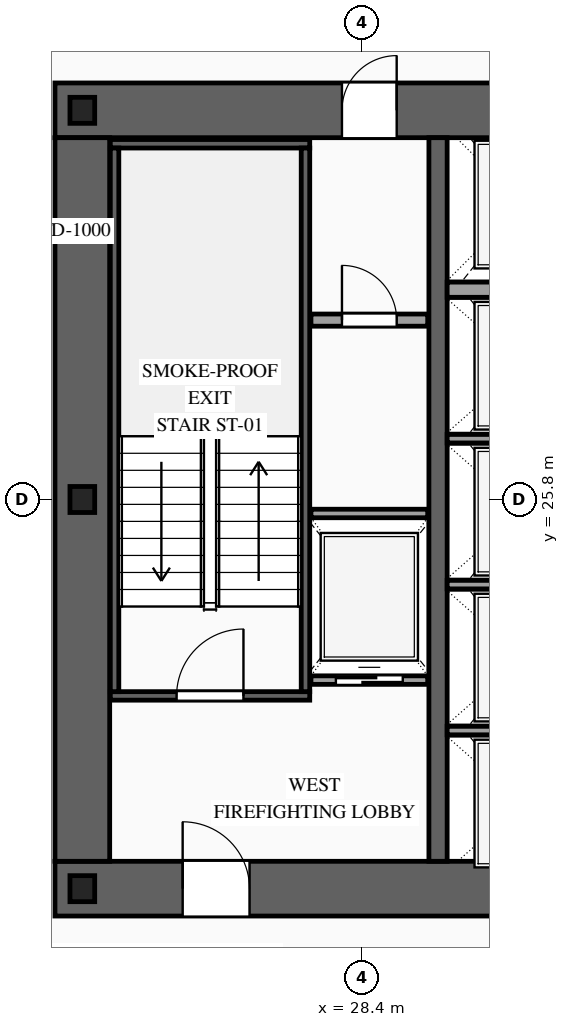
"""IFC4 building model, lengths in metres.
Left out: names, types, materials, properties, quantities, classifications, styles, units other than length and angle.
Written with IfcOpenShell. Run it as: python <this file> out.ifc"""

import sys

from ifc_helpers import new_model, si_unit, direction, frame, frame_2d, origin, origin_2d, place, context, subcontext, project, spatial, rectangle, i_section, extrude, source, transform, mapped, element, fill, save


model = new_model("IFC4")
c1 = context("Model", 3, precision=1e-05, world=origin(), true_north=direction((0.0, 1.0)))
c2 = subcontext(c1, "Body", "Model", "MODEL_VIEW")
j1 = project(units=[si_unit("LENGTHUNIT", "METRE"), si_unit("PLANEANGLEUNIT", "RADIAN")], contexts=[c1])
p1 = place(None, origin())
s1 = spatial("IfcSite", under=j1, at=p1, CompositionType="ELEMENT")
p2 = place(p1, origin())
s2 = spatial("IfcBuilding", under=s1, at=p2, CompositionType="ELEMENT")
p3 = place(p2, frame((0.0, 0.0, 60.4)))
s3 = spatial("IfcBuildingStorey", under=s2, at=p3, CompositionType="ELEMENT", Elevation=60.4)
p4 = place(p3, frame((23.35, 19.4, 0.0), z_axis=(0.0, 0.0, 1.0), x_axis=(1.0, 0.0, 0.0)))
e1 = element("IfcWall", 1, at=p4, inside=s3, PredefinedType="SHEAR", context=c2, shape_type="SweptSolid", body=[
    extrude(rectangle(XDim=27.3, YDim=0.9, at=frame_2d((13.65, 0.0))), origin(), (0.0, 0.0, 1.0), 3.6),
])
p5 = place(p4, frame((2.1, 0.0, 0.0)))
e2 = element("IfcOpeningElement", 2, at=p5, cuts=e1, PredefinedType="OPENING", context=c2, shape_type="SweptSolid", body=[
    extrude(rectangle(XDim=1.1, YDim=2.2, at=frame_2d((0.55, 1.1))), frame((0.0, 0.465, 0.0), z_axis=(0.0, -1.0, 0.0), x_axis=(1.0, 0.0, 0.0)), (0.0, 0.0, 1.0), 0.93),
])
p6 = place(p4, frame((10.0, 0.0, 0.0)))
e3 = element("IfcOpeningElement", 3, at=p6, cuts=e1, PredefinedType="OPENING", context=c2, shape_type="SweptSolid", body=[
    extrude(rectangle(XDim=1.1, YDim=2.2, at=frame_2d((0.55, 1.1))), frame((0.0, 0.465, 0.0), z_axis=(0.0, -1.0, 0.0), x_axis=(1.0, 0.0, 0.0)), (0.0, 0.0, 1.0), 0.93),
])
p7 = place(p4, frame((23.2, 0.0, 0.0)))
e4 = element("IfcOpeningElement", 4, at=p7, cuts=e1, PredefinedType="OPENING", context=c2, shape_type="SweptSolid", body=[
    extrude(rectangle(XDim=1.1, YDim=2.2, at=frame_2d((0.55, 1.1))), frame((0.0, 0.465, 0.0), z_axis=(0.0, -1.0, 0.0), x_axis=(1.0, 0.0, 0.0)), (0.0, 0.0, 1.0), 0.93),
])
p8 = place(p4, frame((19.82, 0.0, 0.0)))
e5 = element("IfcOpeningElement", 5, at=p8, cuts=e1, PredefinedType="OPENING", context=c2, shape_type="SweptSolid", body=[
    extrude(rectangle(XDim=0.9, YDim=2.15, at=frame_2d((0.45, 1.075))), frame((0.0, 0.465, 0.0), z_axis=(0.0, -1.0, 0.0), x_axis=(1.0, 0.0, 0.0)), (0.0, 0.0, 1.0), 0.93),
])
p9 = place(p4, frame((18.38, 0.0, 0.0)))
e6 = element("IfcOpeningElement", 6, at=p9, cuts=e1, PredefinedType="OPENING", context=c2, shape_type="SweptSolid", body=[
    extrude(rectangle(XDim=0.9, YDim=2.15, at=frame_2d((0.45, 1.075))), frame((0.0, 0.465, 0.0), z_axis=(0.0, -1.0, 0.0), x_axis=(1.0, 0.0, 0.0)), (0.0, 0.0, 1.0), 0.93),
])
p10 = place(p3, frame((23.35, 32.2, 0.0), z_axis=(0.0, 0.0, 1.0), x_axis=(1.0, 0.0, 0.0)))
e7 = element("IfcWall", 7, at=p10, inside=s3, PredefinedType="SHEAR", context=c2, shape_type="SweptSolid", body=[
    extrude(rectangle(XDim=27.3, YDim=0.9, at=frame_2d((13.65, 0.0))), origin(), (0.0, 0.0, 1.0), 3.6),
])
p11 = place(p10, frame((4.72, 0.0, 0.0)))
e8 = element("IfcOpeningElement", 8, at=p11, cuts=e7, PredefinedType="OPENING", context=c2, shape_type="SweptSolid", body=[
    extrude(rectangle(XDim=0.9, YDim=2.15, at=frame_2d((0.45, 1.075))), frame((0.0, 0.465, 0.0), z_axis=(0.0, -1.0, 0.0), x_axis=(1.0, 0.0, 0.0)), (0.0, 0.0, 1.0), 0.93),
])
p12 = place(p10, frame((10.0, 0.0, 0.0)))
e9 = element("IfcOpeningElement", 9, at=p12, cuts=e7, PredefinedType="OPENING", context=c2, shape_type="SweptSolid", body=[
    extrude(rectangle(XDim=1.1, YDim=2.2, at=frame_2d((0.55, 1.1))), frame((0.0, 0.465, 0.0), z_axis=(0.0, -1.0, 0.0), x_axis=(1.0, 0.0, 0.0)), (0.0, 0.0, 1.0), 0.93),
])
p13 = place(p10, frame((15.85, 0.0, 0.0)))
e10 = element("IfcOpeningElement", 10, at=p13, cuts=e7, PredefinedType="OPENING", context=c2, shape_type="SweptSolid", body=[
    extrude(rectangle(XDim=1.1, YDim=2.2, at=frame_2d((0.55, 1.1))), frame((0.0, 0.465, 0.0), z_axis=(0.0, -1.0, 0.0), x_axis=(1.0, 0.0, 0.0)), (0.0, 0.0, 1.0), 0.93),
])
p14 = place(p10, frame((19.82, 0.0, 0.0)))
e11 = element("IfcOpeningElement", 11, at=p14, cuts=e7, PredefinedType="OPENING", context=c2, shape_type="SweptSolid", body=[
    extrude(rectangle(XDim=0.9, YDim=2.15, at=frame_2d((0.45, 1.075))), frame((0.0, 0.465, 0.0), z_axis=(0.0, -1.0, 0.0), x_axis=(1.0, 0.0, 0.0)), (0.0, 0.0, 1.0), 0.93),
])
m1 = source(origin(), c2, "Body", "SweptSolid", [
    extrude(rectangle(XDim=11.9, YDim=0.9, at=frame_2d((5.95, 0.0))), origin(), (0.0, 0.0, 1.0), 3.6),
])
p15 = place(p3, frame((23.8, 19.85, 0.0), z_axis=(0.0, 0.0, 1.0), x_axis=(0.0, 1.0, 0.0)))
e12 = element("IfcWall", 12, at=p15, inside=s3, PredefinedType="SHEAR", context=c2, shape_type="MappedRepresentation", body=[
    mapped(m1, transform((0.0, 0.0, 0.0), scale=1.0)),
])
m2 = source(origin(), c2, "Body", "SweptSolid", [
    extrude(rectangle(XDim=11.9, YDim=0.3, at=frame_2d((5.95, 0.0))), origin(), (0.0, 0.0, 1.0), 3.6),
])
p16 = place(p3, frame((29.65, 19.85, 0.0), z_axis=(0.0, 0.0, 1.0), x_axis=(0.0, 1.0, 0.0)))
e13 = element("IfcWall", 13, at=p16, inside=s3, PredefinedType="SOLIDWALL", context=c2, shape_type="MappedRepresentation", body=[
    mapped(m2, transform((0.0, 0.0, 0.0), scale=1.0)),
])
m3 = source(origin(), c2, "Body", "SweptSolid", [
    extrude(i_section(OverallWidth=0.407, OverallDepth=0.428, WebThickness=0.02, FlangeThickness=0.035, at=origin_2d()), origin(), (0.0, 0.0, 1.0), 3.6),
])
for number, where, z_axis, x_axis in (
    (14, (23.8, 19.4, 0.0), (0.0, 0.0, 1.0), (1.0, 0.0, 0.0)),
    (15, (23.8, 25.8, 0.0), (0.0, 0.0, 1.0), (1.0, 0.0, 0.0)),
    (16, (23.8, 32.2, 0.0), (0.0, 0.0, 1.0), (1.0, 0.0, 0.0)),
):
    element("IfcColumn", number, at=place(p3, frame(where, z_axis=z_axis, x_axis=x_axis)), inside=s3, PredefinedType="COLUMN", context=c2, shape_type="MappedRepresentation", body=[
        mapped(m3, transform((0.0, 0.0, 0.0), scale=1.0)),
    ])
p17 = place(p3, frame((27.56, 22.83, 0.0), z_axis=(0.0, 0.0, 1.0), x_axis=(1.0, 0.0, 0.0)))
e17 = element("IfcWall", 17, at=p17, inside=s3, PredefinedType="SOLIDWALL", context=c2, shape_type="SweptSolid", body=[
    extrude(rectangle(XDim=1.92, YDim=0.14, at=frame_2d((0.96, 0.0))), origin(), (0.0, 0.0, 1.0), 3.38),
])
p18 = place(p17, frame((0.41, 0.0, 0.0)))
e18 = element("IfcOpeningElement", 18, at=p18, cuts=e17, PredefinedType="OPENING", context=c2, shape_type="SweptSolid", body=[
    extrude(rectangle(XDim=1.1, YDim=2.2, at=frame_2d((0.55, 1.1))), frame((0.0, 0.085, 0.0), z_axis=(0.0, -1.0, 0.0), x_axis=(1.0, 0.0, 0.0)), (0.0, 0.0, 1.0), 0.17),
])
m4 = source(origin(), c2, "Body", "SweptSolid", [
    extrude(rectangle(XDim=1.92, YDim=0.14, at=frame_2d((0.96, 0.0))), origin(), (0.0, 0.0, 1.0), 3.38),
])
p19 = place(p3, frame((27.56, 25.57, 0.0), z_axis=(0.0, 0.0, 1.0), x_axis=(1.0, 0.0, 0.0)))
e19 = element("IfcWall", 19, at=p19, inside=s3, PredefinedType="SOLIDWALL", context=c2, shape_type="MappedRepresentation", body=[
    mapped(m4, transform((0.0, 0.0, 0.0), scale=1.0)),
])
m5 = source(origin(), c2, "Body", "SweptSolid", [
    extrude(rectangle(XDim=2.5, YDim=0.14, at=frame_2d((1.25, 0.0))), origin(), (0.0, 0.0, 1.0), 3.38),
])
for number, where, z_axis, x_axis in (
    (20, (29.8, 22.0, 0.0), (0.0, 0.0, 1.0), (1.0, 0.0, 0.0)),
    (21, (29.8, 24.4, 0.0), (0.0, 0.0, 1.0), (1.0, 0.0, 0.0)),
    (22, (29.8, 26.8, 0.0), (0.0, 0.0, 1.0), (1.0, 0.0, 0.0)),
):
    element("IfcWall", number, at=place(p3, frame(where, z_axis=z_axis, x_axis=x_axis)), inside=s3, PredefinedType="SOLIDWALL", context=c2, shape_type="MappedRepresentation", body=[
        mapped(m5, transform((0.0, 0.0, 0.0), scale=1.0)),
    ])
m6 = source(origin(), c2, "Body", "SweptSolid", [
    extrude(rectangle(XDim=2.5, YDim=0.25, at=frame_2d((1.25, 0.0))), origin(), (0.0, 0.0, 1.0), 3.38),
])
p20 = place(p3, frame((29.8, 29.25, 0.0), z_axis=(0.0, 0.0, 1.0), x_axis=(1.0, 0.0, 0.0)))
e23 = element("IfcWall", 23, at=p20, inside=s3, PredefinedType="SOLIDWALL", context=c2, shape_type="MappedRepresentation", body=[
    mapped(m6, transform((0.0, 0.0, 0.0), scale=1.0)),
])
p21 = place(p3, frame((24.26, 22.57, 0.0), z_axis=(0.0, 0.0, 1.0), x_axis=(1.0, 0.0, 0.0)))
e24 = element("IfcWall", 24, at=p21, inside=s3, PredefinedType="SOLIDWALL", context=c2, shape_type="SweptSolid", body=[
    extrude(rectangle(XDim=3.28, YDim=0.14, at=frame_2d((1.64, 0.0))), origin(), (0.0, 0.0, 1.0), 3.38),
])
p22 = place(p21, frame((1.09, 0.0, 0.0)))
e25 = element("IfcOpeningElement", 25, at=p22, cuts=e24, PredefinedType="OPENING", context=c2, shape_type="SweptSolid", body=[
    extrude(rectangle(XDim=1.1, YDim=2.2, at=frame_2d((0.55, 1.1))), frame((0.0, 0.085, 0.0), z_axis=(0.0, -1.0, 0.0), x_axis=(1.0, 0.0, 0.0)), (0.0, 0.0, 1.0), 0.17),
])
m7 = source(origin(), c2, "Body", "SweptSolid", [
    extrude(rectangle(XDim=3.28, YDim=0.14, at=frame_2d((1.64, 0.0))), origin(), (0.0, 0.0, 1.0), 3.38),
])
p23 = place(p3, frame((24.26, 31.65, 0.0), z_axis=(0.0, 0.0, 1.0), x_axis=(1.0, 0.0, 0.0)))
e26 = element("IfcWall", 26, at=p23, inside=s3, PredefinedType="SOLIDWALL", context=c2, shape_type="MappedRepresentation", body=[
    mapped(m7, transform((0.0, 0.0, 0.0), scale=1.0)),
])
m8 = source(origin(), c2, "Body", "SweptSolid", [
    extrude(rectangle(XDim=8.94, YDim=0.14, at=frame_2d((4.47, 0.0))), origin(), (0.0, 0.0, 1.0), 3.38),
])
for number, where, z_axis, x_axis in (
    (27, (24.33, 22.64, 0.0), (0.0, 0.0, 1.0), (0.0, 1.0, 0.0)),
    (28, (27.47, 22.64, 0.0), (0.0, 0.0, 1.0), (0.0, 1.0, 0.0)),
):
    element("IfcWall", number, at=place(p3, frame(where, z_axis=z_axis, x_axis=x_axis)), inside=s3, PredefinedType="SOLIDWALL", context=c2, shape_type="MappedRepresentation", body=[
        mapped(m8, transform((0.0, 0.0, 0.0), scale=1.0)),
    ])
p24 = place(p3, frame((27.56, 28.75, 0.0), z_axis=(0.0, 0.0, 1.0), x_axis=(1.0, 0.0, 0.0)))
e29 = element("IfcWall", 29, at=p24, inside=s3, PredefinedType="PARTITIONING", context=c2, shape_type="SweptSolid", body=[
    extrude(rectangle(XDim=1.92, YDim=0.2, at=frame_2d((0.96, 0.0))), origin(), (0.0, 0.0, 1.0), 3.38),
])
p25 = place(p24, frame((0.51, 0.0, 0.0)))
e30 = element("IfcOpeningElement", 30, at=p25, cuts=e29, PredefinedType="OPENING", context=c2, shape_type="SweptSolid", body=[
    extrude(rectangle(XDim=0.9, YDim=2.15, at=frame_2d((0.45, 1.075))), frame((0.0, 0.115, 0.0), z_axis=(0.0, -1.0, 0.0), x_axis=(1.0, 0.0, 0.0)), (0.0, 0.0, 1.0), 0.23),
])
m9 = source(origin(), c2, "Body", "SweptSolid", [
    extrude(rectangle(XDim=1.1, YDim=2.2, at=frame_2d((0.55, 1.1))), frame((0.0, 0.025, 0.0), z_axis=(0.0, -1.0, 0.0), x_axis=(1.0, 0.0, 0.0)), (0.0, 0.0, 1.0), 0.05),
])
p26 = place(p18, origin())
e31 = element("IfcDoor", 31, at=p26, inside=s3, OperationType="SLIDING_TO_LEFT", PredefinedType="DOOR", context=c2, shape_type="MappedRepresentation", body=[
    mapped(m9, transform((0.0, 0.0, 0.0), scale=1.0)),
])
fill(e18, e31)
m10 = source(origin(), c2, "Body", "SweptSolid", [
    extrude(rectangle(XDim=1.1, YDim=2.2, at=frame_2d((0.55, 1.1))), frame((0.0, 0.025, 0.0), z_axis=(0.0, -1.0, 0.0), x_axis=(1.0, 0.0, 0.0)), (0.0, 0.0, 1.0), 0.05),
])
p27 = place(p22, origin())
e32 = element("IfcDoor", 32, at=p27, inside=s3, OperationType="SINGLE_SWING_RIGHT", PredefinedType="DOOR", context=c2, shape_type="MappedRepresentation", body=[
    mapped(m10, transform((0.0, 0.0, 0.0), scale=1.0)),
])
fill(e25, e32)
p28 = place(p5, origin())
e33 = element("IfcDoor", 33, at=p28, inside=s3, OperationType="SINGLE_SWING_LEFT", PredefinedType="DOOR", context=c2, shape_type="MappedRepresentation", body=[
    mapped(m10, transform((0.0, 0.0, 0.0), scale=1.0)),
])
fill(e2, e33)
m11 = source(origin(), c2, "Body", "SweptSolid", [
    extrude(rectangle(XDim=0.9, YDim=2.15, at=frame_2d((0.45, 1.075))), frame((0.0, 0.025, 0.0), z_axis=(0.0, -1.0, 0.0), x_axis=(1.0, 0.0, 0.0)), (0.0, 0.0, 1.0), 0.05),
])
p29 = place(p11, origin())
e34 = element("IfcDoor", 34, at=p29, inside=s3, OperationType="SINGLE_SWING_RIGHT", PredefinedType="DOOR", context=c2, shape_type="MappedRepresentation", body=[
    mapped(m11, transform((0.0, 0.0, 0.0), scale=1.0)),
])
fill(e8, e34)
p30 = place(p25, origin())
e35 = element("IfcDoor", 35, at=p30, inside=s3, OperationType="SINGLE_SWING_LEFT", PredefinedType="DOOR", context=c2, shape_type="MappedRepresentation", body=[
    mapped(m11, transform((0.0, 0.0, 0.0), scale=1.0)),
])
fill(e30, e35)
save(model, sys.argv[1])
